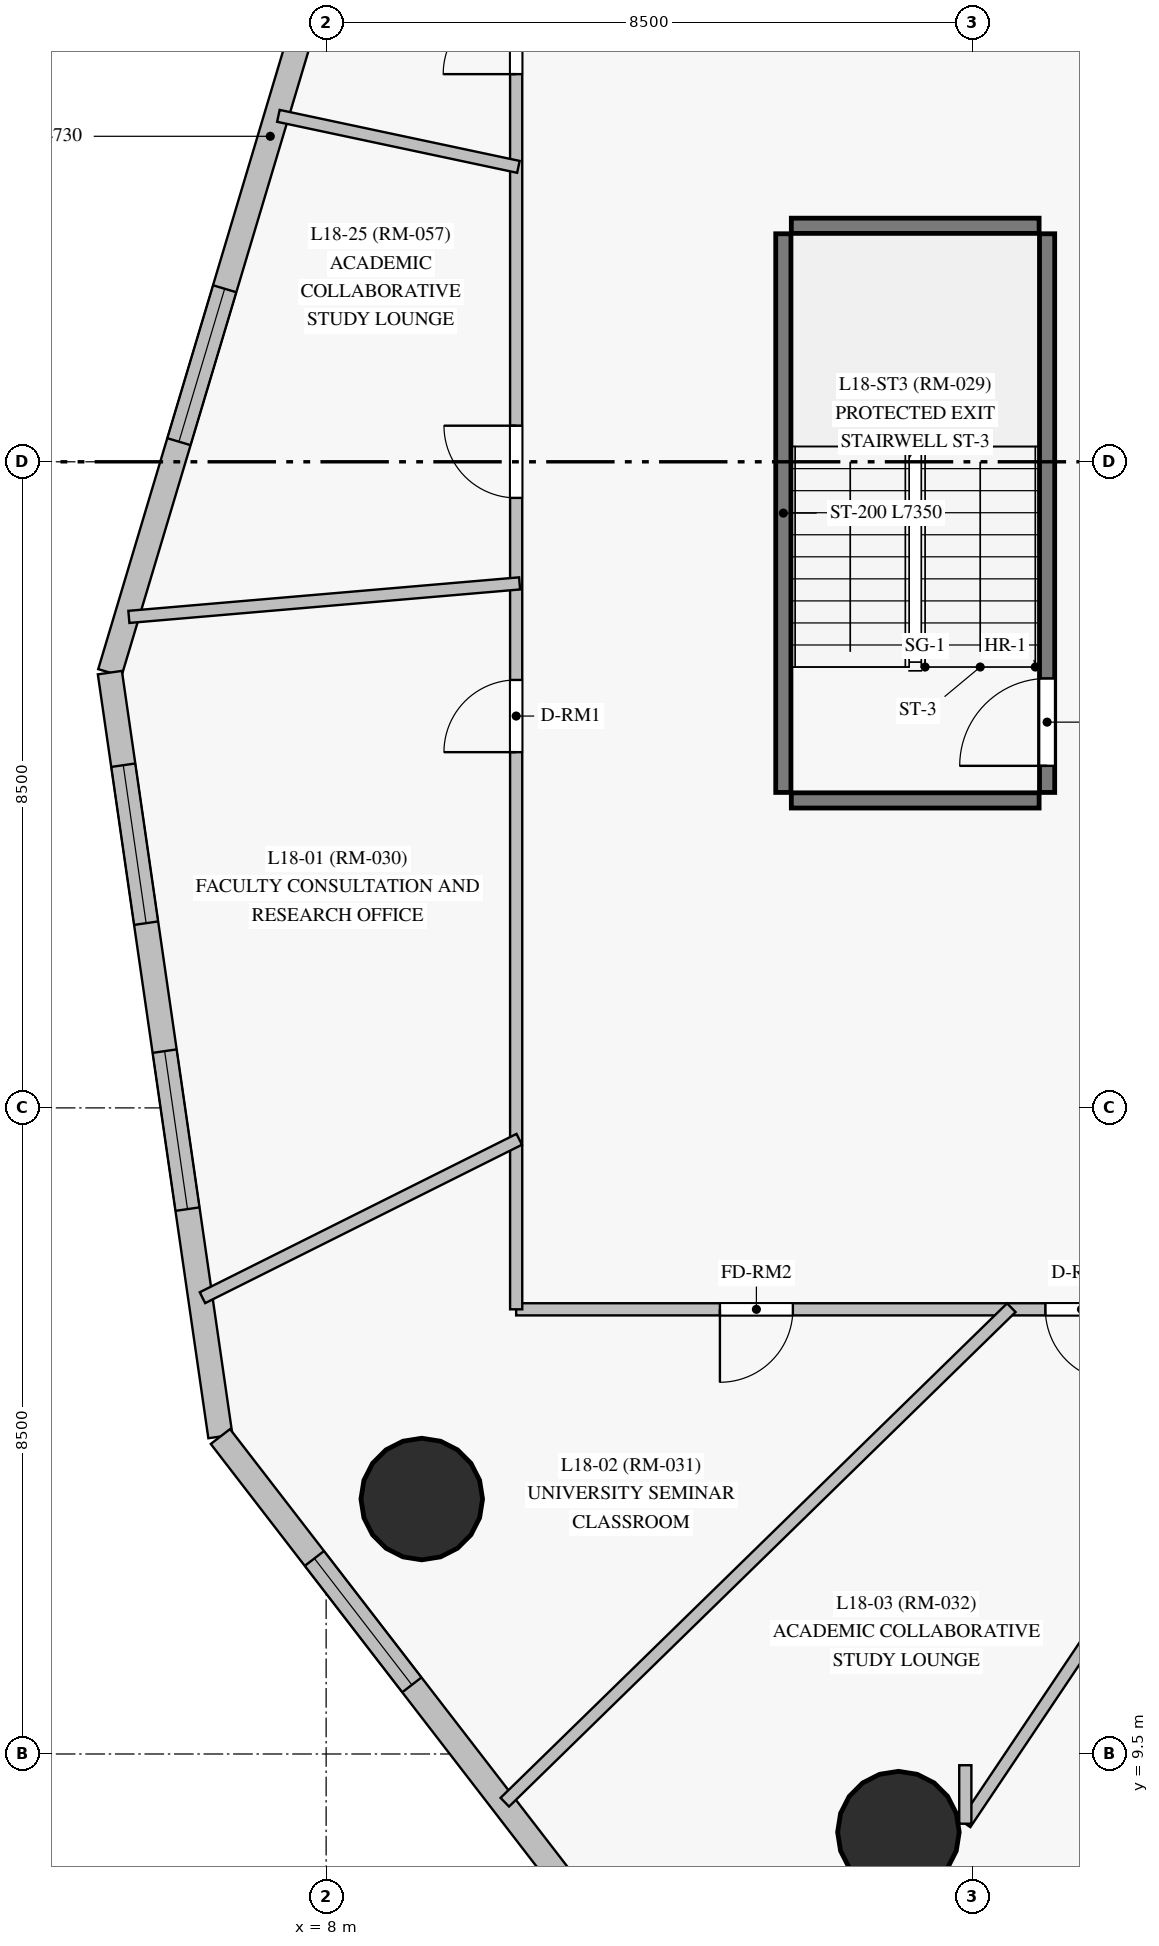
"""IFC4 building model, lengths in metres.
Left out: names, types, materials, properties, quantities, classifications, styles, units other than length and angle.
Written with IfcOpenShell. Run it as: python <this file> out.ifc"""

import sys

from ifc_helpers import new_model, si_unit, direction, frame, frame_2d, origin, origin_with_axes, origin_2d, place, context, subcontext, project, spatial, rectangle, circle, extrude, source, transform, mapped, element, fill, save


model = new_model("IFC4")
c1 = context("Model", 3, precision=1e-05, world=origin(), true_north=direction((0.0, 1.0)))
c2 = subcontext(c1, "Body", "Model", "MODEL_VIEW")
j1 = project(units=[si_unit("LENGTHUNIT", "METRE"), si_unit("PLANEANGLEUNIT", "RADIAN")], contexts=[c1])
p1 = place(None, origin())
s1 = spatial("IfcSite", under=j1, at=p1, CompositionType="ELEMENT")
p2 = place(p1, origin())
s2 = spatial("IfcBuilding", under=s1, at=p2, CompositionType="ELEMENT")
p3 = place(p2, frame((0.0, 0.0, 69.7)))
s3 = spatial("IfcBuildingStorey", under=s2, at=p3, CompositionType="ELEMENT", Elevation=69.7)
m1 = source(origin_with_axes(), c2, "Body", "SweptSolid", [
    extrude(circle(Radius=0.8, at=origin_2d()), origin(), (0.0, 0.0, 1.0), 3.6),
])
for number, where, z_axis, x_axis in (
    (1, (9.258, 12.854, 0.0), (0.0, 0.0, 1.0), (1.0, 0.0, 0.0)),
    (2, (15.529, 8.472, 0.0), (0.0, 0.0, 1.0), (1.0, 0.0, 0.0)),
):
    element("IfcColumn", number, at=place(p3, frame(where, z_axis=z_axis, x_axis=x_axis)), inside=s3, PredefinedType="COLUMN", context=c2, shape_type="MappedRepresentation", body=[
        mapped(m1, transform((0.0, 0.0, 0.0), scale=1.0)),
    ])
p4 = place(p3, frame((9.375, 37.838, 0.0), z_axis=(0.0, 0.0, 1.0), x_axis=(-0.286532715345, -0.958070458284, 0.0)))
e3 = element("IfcWall", 3, at=p4, inside=s3, PredefinedType="SOLIDWALL", context=c2, shape_type="SweptSolid", body=[
    extrude(rectangle(XDim=14.729, YDim=0.32, at=frame_2d((7.365, 0.0))), origin(), (0.0, 0.0, 1.0), 3.35),
])
p5 = place(p4, frame((2.517, 0.0, 0.85)))
e4 = element("IfcOpeningElement", 4, at=p5, cuts=e3, PredefinedType="OPENING", context=c2, shape_type="SweptSolid", body=[
    extrude(rectangle(XDim=2.1, YDim=1.95, at=frame_2d((1.05, 0.975))), frame((0.0, 0.17, 0.0), z_axis=(0.0, -1.0, 0.0), x_axis=(1.0, 0.0, 0.0)), (0.0, 0.0, 1.0), 0.34),
])
p6 = place(p4, frame((9.458, 0.0, 0.85)))
e5 = element("IfcOpeningElement", 5, at=p6, cuts=e3, PredefinedType="OPENING", context=c2, shape_type="SweptSolid", body=[
    extrude(rectangle(XDim=2.1, YDim=1.95, at=frame_2d((1.05, 0.975))), frame((0.0, 0.17, 0.0), z_axis=(0.0, -1.0, 0.0), x_axis=(1.0, 0.0, 0.0)), (0.0, 0.0, 1.0), 0.34),
])
p7 = place(p3, frame((5.155, 23.726, 0.0), z_axis=(0.0, 0.0, 1.0), x_axis=(0.143198365265, -0.98969400735, 0.0)))
e6 = element("IfcWall", 6, at=p7, inside=s3, PredefinedType="SOLIDWALL", context=c2, shape_type="SweptSolid", body=[
    extrude(rectangle(XDim=10.155, YDim=0.32, at=frame_2d((5.077, 0.0))), origin(), (0.0, 0.0, 1.0), 3.35),
])
p8 = place(p7, frame((1.23, 0.0, 0.85)))
e7 = element("IfcOpeningElement", 7, at=p8, cuts=e6, PredefinedType="OPENING", context=c2, shape_type="SweptSolid", body=[
    extrude(rectangle(XDim=2.1, YDim=1.95, at=frame_2d((1.05, 0.975))), frame((0.0, 0.17, 0.0), z_axis=(0.0, -1.0, 0.0), x_axis=(1.0, 0.0, 0.0)), (0.0, 0.0, 1.0), 0.34),
])
p9 = place(p7, frame((5.031, 0.0, 0.85)))
e8 = element("IfcOpeningElement", 8, at=p9, cuts=e6, PredefinedType="OPENING", context=c2, shape_type="SweptSolid", body=[
    extrude(rectangle(XDim=2.1, YDim=1.95, at=frame_2d((1.05, 0.975))), frame((0.0, 0.17, 0.0), z_axis=(0.0, -1.0, 0.0), x_axis=(1.0, 0.0, 0.0)), (0.0, 0.0, 1.0), 0.34),
])
p10 = place(p3, frame((6.609, 13.677, 0.0), z_axis=(0.0, 0.0, 1.0), x_axis=(0.610596304002, -0.791942014001, 0.0)))
e9 = element("IfcWall", 9, at=p10, inside=s3, PredefinedType="SOLIDWALL", context=c2, shape_type="SweptSolid", body=[
    extrude(rectangle(XDim=12.625, YDim=0.32, at=frame_2d((6.312, 0.0))), origin(), (0.0, 0.0, 1.0), 3.35),
])
p11 = place(p10, frame((2.025, 0.0, 0.85)))
e10 = element("IfcOpeningElement", 10, at=p11, cuts=e9, PredefinedType="OPENING", context=c2, shape_type="SweptSolid", body=[
    extrude(rectangle(XDim=2.1, YDim=1.95, at=frame_2d((1.05, 0.975))), frame((0.0, 0.17, 0.0), z_axis=(0.0, -1.0, 0.0), x_axis=(1.0, 0.0, 0.0)), (0.0, 0.0, 1.0), 0.34),
])
p12 = place(p10, frame((7.773, 0.0, 0.85)))
e11 = element("IfcOpeningElement", 11, at=p12, cuts=e9, PredefinedType="OPENING", context=c2, shape_type="SweptSolid", body=[
    extrude(rectangle(XDim=2.1, YDim=1.95, at=frame_2d((1.05, 0.975))), frame((0.0, 0.17, 0.0), z_axis=(0.0, -1.0, 0.0), x_axis=(1.0, 0.0, 0.0)), (0.0, 0.0, 1.0), 0.34),
])
p13 = place(p3, frame((14.015, 22.15, 0.0), z_axis=(0.0, 0.0, 1.0), x_axis=(0.0, 1.0, 0.0)))
e12 = element("IfcWall", 12, at=p13, inside=s3, PredefinedType="SHEAR", context=c2, shape_type="SweptSolid", body=[
    extrude(rectangle(XDim=7.35, YDim=0.2, at=frame_2d((3.675, 0.0))), origin(), (0.0, 0.0, 1.0), 3.35),
])
p14 = place(p3, frame((17.485, 22.15, 0.0), z_axis=(0.0, 0.0, 1.0), x_axis=(0.0, 1.0, 0.0)))
e13 = element("IfcWall", 13, at=p14, inside=s3, PredefinedType="SHEAR", context=c2, shape_type="SweptSolid", body=[
    extrude(rectangle(XDim=7.35, YDim=0.2, at=frame_2d((3.675, 0.0))), origin(), (0.0, 0.0, 1.0), 3.35),
])
p15 = place(p14, frame((0.35, 0.0, 0.0)))
e14 = element("IfcOpeningElement", 14, at=p15, cuts=e13, PredefinedType="OPENING", context=c2, shape_type="SweptSolid", body=[
    extrude(rectangle(XDim=1.15, YDim=2.15, at=frame_2d((0.575, 1.075))), frame((0.0, 0.11, 0.0), z_axis=(0.0, -1.0, 0.0), x_axis=(1.0, 0.0, 0.0)), (0.0, 0.0, 1.0), 0.22),
])
for number, where, z_axis, x_axis in (
    (15, (14.12, 22.045, 0.0), (0.0, 0.0, 1.0), (1.0, 0.0, 0.0)),
    (16, (14.12, 29.605, 0.0), (0.0, 0.0, 1.0), (1.0, 0.0, 0.0)),
):
    element("IfcWall", number, at=place(p3, frame(where, z_axis=z_axis, x_axis=x_axis)), inside=s3, PredefinedType="SHEAR", context=c2, shape_type="SweptSolid", body=[
        extrude(rectangle(XDim=3.26, YDim=0.2, at=frame_2d((1.63, 0.0))), origin(), (0.0, 0.0, 1.0), 3.35),
    ])
p16 = place(p3, frame((40.25, 15.35, 0.0), z_axis=(0.0, 0.0, 1.0), x_axis=(-1.0, 0.0, 0.0)))
e17 = element("IfcWall", 17, at=p16, inside=s3, PredefinedType="PARTITIONING", context=c2, shape_type="SweptSolid", body=[
    extrude(rectangle(XDim=29.75, YDim=0.16, at=frame_2d((14.875, 0.0))), origin(), (0.0, 0.0, 1.0), 2.7),
])
p17 = place(p16, frame((26.11, 0.0, 0.0)))
e18 = element("IfcOpeningElement", 18, at=p17, cuts=e17, PredefinedType="OPENING", context=c2, shape_type="SweptSolid", body=[
    extrude(rectangle(XDim=0.96, YDim=2.15, at=frame_2d((0.48, 1.075))), frame((0.0, 0.09, 0.0), z_axis=(0.0, -1.0, 0.0), x_axis=(1.0, 0.0, 0.0)), (0.0, 0.0, 1.0), 0.18),
])
p18 = place(p16, frame((21.837, 0.0, 0.0)))
e19 = element("IfcOpeningElement", 19, at=p18, cuts=e17, PredefinedType="OPENING", context=c2, shape_type="SweptSolid", body=[
    extrude(rectangle(XDim=0.95, YDim=2.15, at=frame_2d((0.475, 1.075))), frame((0.0, 0.09, 0.0), z_axis=(0.0, -1.0, 0.0), x_axis=(1.0, 0.0, 0.0)), (0.0, 0.0, 1.0), 0.18),
])
p19 = place(p16, frame((17.737, 0.0, 0.0)))
e20 = element("IfcOpeningElement", 20, at=p19, cuts=e17, PredefinedType="OPENING", context=c2, shape_type="SweptSolid", body=[
    extrude(rectangle(XDim=0.95, YDim=2.15, at=frame_2d((0.475, 1.075))), frame((0.0, 0.09, 0.0), z_axis=(0.0, -1.0, 0.0), x_axis=(1.0, 0.0, 0.0)), (0.0, 0.0, 1.0), 0.18),
])
p20 = place(p16, frame((15.604, 0.0, 0.0)))
e21 = element("IfcOpeningElement", 21, at=p20, cuts=e17, PredefinedType="OPENING", context=c2, shape_type="SweptSolid", body=[
    extrude(rectangle(XDim=0.95, YDim=2.15, at=frame_2d((0.475, 1.075))), frame((0.0, 0.09, 0.0), z_axis=(0.0, -1.0, 0.0), x_axis=(1.0, 0.0, 0.0)), (0.0, 0.0, 1.0), 0.18),
])
p21 = place(p16, frame((12.96, 0.0, 0.0)))
e22 = element("IfcOpeningElement", 22, at=p21, cuts=e17, PredefinedType="OPENING", context=c2, shape_type="SweptSolid", body=[
    extrude(rectangle(XDim=0.96, YDim=2.15, at=frame_2d((0.48, 1.075))), frame((0.0, 0.09, 0.0), z_axis=(0.0, -1.0, 0.0), x_axis=(1.0, 0.0, 0.0)), (0.0, 0.0, 1.0), 0.18),
])
p22 = place(p16, frame((11.281, 0.0, 0.0)))
e23 = element("IfcOpeningElement", 23, at=p22, cuts=e17, PredefinedType="OPENING", context=c2, shape_type="SweptSolid", body=[
    extrude(rectangle(XDim=0.95, YDim=2.15, at=frame_2d((0.475, 1.075))), frame((0.0, 0.09, 0.0), z_axis=(0.0, -1.0, 0.0), x_axis=(1.0, 0.0, 0.0)), (0.0, 0.0, 1.0), 0.18),
])
p23 = place(p16, frame((9.601, 0.0, 0.0)))
e24 = element("IfcOpeningElement", 24, at=p23, cuts=e17, PredefinedType="OPENING", context=c2, shape_type="SweptSolid", body=[
    extrude(rectangle(XDim=0.96, YDim=2.15, at=frame_2d((0.48, 1.075))), frame((0.0, 0.09, 0.0), z_axis=(0.0, -1.0, 0.0), x_axis=(1.0, 0.0, 0.0)), (0.0, 0.0, 1.0), 0.18),
])
p24 = place(p16, frame((8.498, 0.0, 0.0)))
e25 = element("IfcOpeningElement", 25, at=p24, cuts=e17, PredefinedType="OPENING", context=c2, shape_type="SweptSolid", body=[
    extrude(rectangle(XDim=0.95, YDim=2.15, at=frame_2d((0.475, 1.075))), frame((0.0, 0.09, 0.0), z_axis=(0.0, -1.0, 0.0), x_axis=(1.0, 0.0, 0.0)), (0.0, 0.0, 1.0), 0.18),
])
p25 = place(p16, frame((2.579, 0.0, 0.0)))
e26 = element("IfcOpeningElement", 26, at=p25, cuts=e17, PredefinedType="OPENING", context=c2, shape_type="SweptSolid", body=[
    extrude(rectangle(XDim=0.95, YDim=2.15, at=frame_2d((0.475, 1.075))), frame((0.0, 0.09, 0.0), z_axis=(0.0, -1.0, 0.0), x_axis=(1.0, 0.0, 0.0)), (0.0, 0.0, 1.0), 0.18),
])
p26 = place(p3, frame((10.5, 15.35, 0.0), z_axis=(0.0, 0.0, 1.0), x_axis=(0.0, 1.0, 0.0)))
e27 = element("IfcWall", 27, at=p26, inside=s3, PredefinedType="PARTITIONING", context=c2, shape_type="SweptSolid", body=[
    extrude(rectangle(XDim=22.3, YDim=0.16, at=frame_2d((11.15, 0.0))), origin(), (0.0, 0.0, 1.0), 2.75),
])
p27 = place(p26, frame((7.33, 0.0, 0.0)))
e28 = element("IfcOpeningElement", 28, at=p27, cuts=e27, PredefinedType="OPENING", context=c2, shape_type="SweptSolid", body=[
    extrude(rectangle(XDim=0.95, YDim=2.15, at=frame_2d((0.475, 1.075))), frame((0.0, 0.09, 0.0), z_axis=(0.0, -1.0, 0.0), x_axis=(1.0, 0.0, 0.0)), (0.0, 0.0, 1.0), 0.18),
])
p28 = place(p26, frame((16.25, 0.0, 0.0)))
e29 = element("IfcOpeningElement", 29, at=p28, cuts=e27, PredefinedType="OPENING", context=c2, shape_type="SweptSolid", body=[
    extrude(rectangle(XDim=0.96, YDim=2.15, at=frame_2d((0.48, 1.075))), frame((0.0, 0.09, 0.0), z_axis=(0.0, -1.0, 0.0), x_axis=(1.0, 0.0, 0.0)), (0.0, 0.0, 1.0), 0.18),
])
p29 = place(p26, frame((10.675, 0.0, 0.0)))
e30 = element("IfcOpeningElement", 30, at=p29, cuts=e27, PredefinedType="OPENING", context=c2, shape_type="SweptSolid", body=[
    extrude(rectangle(XDim=0.95, YDim=2.15, at=frame_2d((0.475, 1.075))), frame((0.0, 0.09, 0.0), z_axis=(0.0, -1.0, 0.0), x_axis=(1.0, 0.0, 0.0)), (0.0, 0.0, 1.0), 0.18),
])
p30 = place(p3, frame((23.096, 15.39, 0.0), z_axis=(0.0, 0.0, 1.0), x_axis=(-0.433095236194, -0.901348166019, 0.0)))
e31 = element("IfcWall", 31, at=p30, inside=s3, PredefinedType="PARTITIONING", context=c2, shape_type="SweptSolid", body=[
    extrude(rectangle(XDim=13.555, YDim=0.16, at=frame_2d((6.777, 0.0))), origin(), (0.0, 0.0, 1.0), 3.35),
])
p31 = place(p3, frame((17.014, 15.371, 0.0), z_axis=(0.0, 0.0, 1.0), x_axis=(-0.715549557625, -0.69856197333, 0.0)))
e32 = element("IfcWall", 32, at=p31, inside=s3, PredefinedType="PARTITIONING", context=c2, shape_type="SweptSolid", body=[
    extrude(rectangle(XDim=9.313, YDim=0.16, at=frame_2d((4.656, 0.0))), origin(), (0.0, 0.0, 1.0), 3.35),
])
p32 = place(p3, frame((20.965, 15.375, 0.0), z_axis=(0.0, 0.0, 1.0), x_axis=(-0.557067606791, -0.830467146529, 0.0)))
e33 = element("IfcWall", 33, at=p32, inside=s3, PredefinedType="PARTITIONING", context=c2, shape_type="SweptSolid", body=[
    extrude(rectangle(XDim=8.179, YDim=0.16, at=frame_2d((4.089, 0.0))), origin(), (0.0, 0.0, 1.0), 3.35),
])
p33 = place(p3, frame((5.405, 24.459, 0.0), z_axis=(0.0, 0.0, 1.0), x_axis=(0.99634549852, 0.085414563041, 0.0)))
e34 = element("IfcWall", 34, at=p33, inside=s3, PredefinedType="PARTITIONING", context=c2, shape_type="SweptSolid", body=[
    extrude(rectangle(XDim=5.159, YDim=0.16, at=frame_2d((2.58, 0.0))), origin(), (0.0, 0.0, 1.0), 3.35),
])
p34 = place(p3, frame((10.54, 17.587, 0.0), z_axis=(0.0, 0.0, 1.0), x_axis=(-0.894427191, -0.4472135955, 0.0)))
e35 = element("IfcWall", 35, at=p34, inside=s3, PredefinedType="PARTITIONING", context=c2, shape_type="SweptSolid", body=[
    extrude(rectangle(XDim=4.659, YDim=0.16, at=frame_2d((2.33, 0.0))), origin(), (0.0, 0.0, 1.0), 3.35),
])
p35 = place(p3, frame((10.529, 30.38, 0.0), z_axis=(0.0, 0.0, 1.0), x_axis=(-0.978162887363, 0.207839759876, 0.0)))
e36 = element("IfcWall", 36, at=p35, inside=s3, PredefinedType="PARTITIONING", context=c2, shape_type="SweptSolid", body=[
    extrude(rectangle(XDim=3.228, YDim=0.16, at=frame_2d((1.614, 0.0))), origin(), (0.0, 0.0, 1.0), 3.35),
])
p36 = place(p3, frame((16.409, 8.583, 0.0), z_axis=(0.0, 0.0, 1.0), x_axis=(0.0, 1.0, 0.0)))
e37 = element("IfcWall", 37, at=p36, inside=s3, PredefinedType="PARTITIONING", context=c2, shape_type="SweptSolid", body=[
    extrude(rectangle(XDim=0.769, YDim=0.16, at=frame_2d((0.385, 0.0))), origin(), (0.0, 0.0, 1.0), 2.7),
])
m2 = source(origin_with_axes(), c2, "Body", "SweptSolid", [
    extrude(rectangle(XDim=2.1, YDim=1.95, at=frame_2d((1.05, 0.975))), frame((0.0, 0.03, 0.0), z_axis=(0.0, -1.0, 0.0), x_axis=(1.0, 0.0, 0.0)), (0.0, 0.0, 1.0), 0.06),
])
p37 = place(p6, origin())
e38 = element("IfcWindow", 38, at=p37, inside=s3, PartitioningType="SINGLE_PANEL", PredefinedType="WINDOW", context=c2, shape_type="MappedRepresentation", body=[
    mapped(m2, transform((0.0, 0.0, 0.0), scale=1.0)),
])
fill(e5, e38)
p38 = place(p8, origin())
e39 = element("IfcWindow", 39, at=p38, inside=s3, PartitioningType="SINGLE_PANEL", PredefinedType="WINDOW", context=c2, shape_type="MappedRepresentation", body=[
    mapped(m2, transform((0.0, 0.0, 0.0), scale=1.0)),
])
fill(e7, e39)
p39 = place(p9, origin())
e40 = element("IfcWindow", 40, at=p39, inside=s3, PartitioningType="SINGLE_PANEL", PredefinedType="WINDOW", context=c2, shape_type="MappedRepresentation", body=[
    mapped(m2, transform((0.0, 0.0, 0.0), scale=1.0)),
])
fill(e8, e40)
p40 = place(p11, origin())
e41 = element("IfcWindow", 41, at=p40, inside=s3, PartitioningType="SINGLE_PANEL", PredefinedType="WINDOW", context=c2, shape_type="MappedRepresentation", body=[
    mapped(m2, transform((0.0, 0.0, 0.0), scale=1.0)),
])
fill(e10, e41)
m3 = source(origin_with_axes(), c2, "Body", "SweptSolid", [
    extrude(rectangle(XDim=1.15, YDim=2.15, at=frame_2d((0.575, 1.075))), frame((0.0, 0.025, 0.0), z_axis=(0.0, -1.0, 0.0), x_axis=(1.0, 0.0, 0.0)), (0.0, 0.0, 1.0), 0.05),
])
p41 = place(p15, origin())
e42 = element("IfcDoor", 42, at=p41, inside=s3, OperationType="SINGLE_SWING_LEFT", PredefinedType="DOOR", context=c2, shape_type="MappedRepresentation", body=[
    mapped(m3, transform((0.0, 0.0, 0.0), scale=1.0)),
])
fill(e14, e42)
m4 = source(origin_with_axes(), c2, "Body", "SweptSolid", [
    extrude(rectangle(XDim=0.95, YDim=2.15, at=frame_2d((0.475, 1.075))), frame((0.0, 0.025, 0.0), z_axis=(0.0, -1.0, 0.0), x_axis=(1.0, 0.0, 0.0)), (0.0, 0.0, 1.0), 0.05),
])
p42 = place(p27, origin())
e43 = element("IfcDoor", 43, at=p42, inside=s3, OperationType="SINGLE_SWING_LEFT", PredefinedType="DOOR", context=c2, shape_type="MappedRepresentation", body=[
    mapped(m4, transform((0.0, 0.0, 0.0), scale=1.0)),
])
fill(e28, e43)
m5 = source(origin_with_axes(), c2, "Body", "SweptSolid", [
    extrude(rectangle(XDim=0.96, YDim=2.15, at=frame_2d((0.48, 1.075))), frame((0.0, 0.025, 0.0), z_axis=(0.0, -1.0, 0.0), x_axis=(1.0, 0.0, 0.0)), (0.0, 0.0, 1.0), 0.05),
])
p43 = place(p17, origin())
e44 = element("IfcDoor", 44, at=p43, inside=s3, OperationType="SINGLE_SWING_RIGHT", PredefinedType="DOOR", context=c2, shape_type="MappedRepresentation", body=[
    mapped(m5, transform((0.0, 0.0, 0.0), scale=1.0)),
])
fill(e18, e44)
p44 = place(p18, origin())
e45 = element("IfcDoor", 45, at=p44, inside=s3, OperationType="SINGLE_SWING_LEFT", PredefinedType="DOOR", context=c2, shape_type="MappedRepresentation", body=[
    mapped(m4, transform((0.0, 0.0, 0.0), scale=1.0)),
])
fill(e19, e45)
p45 = place(p28, origin())
e46 = element("IfcDoor", 46, at=p45, inside=s3, OperationType="SINGLE_SWING_LEFT", PredefinedType="DOOR", context=c2, shape_type="MappedRepresentation", body=[
    mapped(m5, transform((0.0, 0.0, 0.0), scale=1.0)),
])
fill(e29, e46)
p46 = place(p29, origin())
e47 = element("IfcDoor", 47, at=p46, inside=s3, OperationType="SINGLE_SWING_RIGHT", PredefinedType="DOOR", context=c2, shape_type="MappedRepresentation", body=[
    mapped(m4, transform((0.0, 0.0, 0.0), scale=1.0)),
])
fill(e30, e47)
save(model, sys.argv[1])
